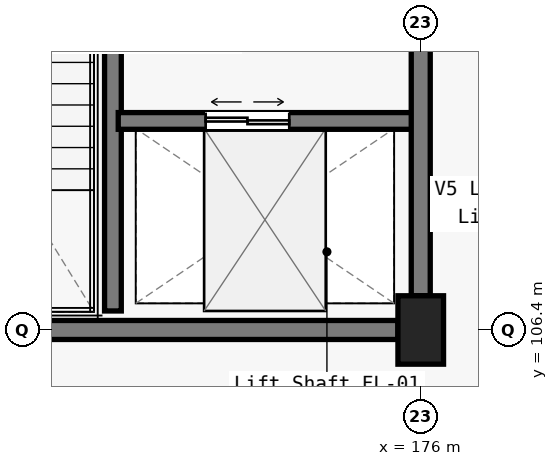
"""IFC4 building model, lengths in metres.
Left out: names, types, materials, properties, quantities, classifications, styles, units other than length and angle.
Written with IfcOpenShell. Run it as: python <this file> out.ifc"""

import sys

from ifc_helpers import new_model, si_unit, direction, frame, frame_2d, origin, origin_2d, place, context, subcontext, project, spatial, rectangle, extrude, element, fill, save


model = new_model("IFC4")
c1 = context("Model", 3, precision=1e-05, world=origin(), true_north=direction((0.0, 1.0)))
c2 = subcontext(c1, "Body", "Model", "MODEL_VIEW")
j1 = project(units=[si_unit("LENGTHUNIT", "METRE"), si_unit("PLANEANGLEUNIT", "RADIAN")], contexts=[c1])
p1 = place(None, origin())
s1 = spatial("IfcSite", under=j1, at=p1, CompositionType="ELEMENT")
p2 = place(p1, origin())
s2 = spatial("IfcBuilding", under=s1, at=p2, CompositionType="ELEMENT")
p3 = place(p2, origin())
s3 = spatial("IfcBuildingStorey", under=s2, at=p3, CompositionType="ELEMENT", Elevation=0.0)
p4 = place(p3, frame((176.0, 106.4, 0.0), z_axis=(0.0, 0.0, 1.0), x_axis=(1.0, 0.0, 0.0)))
e1 = element("IfcColumn", 1, at=p4, inside=s3, PredefinedType="COLUMN", context=c2, shape_type="SweptSolid", body=[
    extrude(rectangle(XDim=0.6, YDim=0.9, at=origin_2d()), origin(), (0.0, 0.0, 1.0), 5.4),
])
p5 = place(p3, frame((168.35, 106.4, 0.0), z_axis=(0.0, 0.0, 1.0), x_axis=(1.0, 0.0, 0.0)))
e2 = element("IfcWall", 2, at=p5, inside=s3, PredefinedType="SOLIDWALL", context=c2, shape_type="SweptSolid", body=[
    extrude(rectangle(XDim=7.35, YDim=0.25, at=frame_2d((3.675, 0.0))), origin(), (0.0, 0.0, 1.0), 4.225),
])
p6 = place(p3, frame((171.95, 106.65, 0.0), z_axis=(0.0, 0.0, 1.0), x_axis=(0.0, 1.0, 0.0)))
e3 = element("IfcWall", 3, at=p6, inside=s3, PredefinedType="SOLIDWALL", context=c2, shape_type="SweptSolid", body=[
    extrude(rectangle(XDim=7.1, YDim=0.22, at=frame_2d((3.55, 0.0))), origin(), (0.0, 0.0, 1.0), 5.1),
])
p7 = place(p6, frame((5.55, 0.0, 0.0)))
e4 = element("IfcOpeningElement", 4, at=p7, cuts=e3, PredefinedType="OPENING", context=c2, shape_type="SweptSolid", body=[
    extrude(rectangle(XDim=1.2, YDim=2.15, at=frame_2d((0.6, 1.075))), frame((0.0, 0.12, 0.0), z_axis=(0.0, -1.0, 0.0), x_axis=(1.0, 0.0, 0.0)), (0.0, 0.0, 1.0), 0.24),
])
p8 = place(p3, frame((172.02, 109.15, 0.0), z_axis=(0.0, 0.0, 1.0), x_axis=(1.0, 0.0, 0.0)))
e5 = element("IfcWall", 5, at=p8, inside=s3, PredefinedType="SOLIDWALL", context=c2, shape_type="SweptSolid", body=[
    extrude(rectangle(XDim=3.93, YDim=0.22, at=frame_2d((1.965, 0.0))), origin(), (0.0, 0.0, 1.0), 4.475),
])
p9 = place(p8, frame((1.15, 0.0, 0.0)))
e6 = element("IfcOpeningElement", 6, at=p9, cuts=e5, PredefinedType="OPENING", context=c2, shape_type="SweptSolid", body=[
    extrude(rectangle(XDim=1.1, YDim=2.2, at=frame_2d((0.55, 1.1))), frame((0.0, 0.12, 0.0), z_axis=(0.0, -1.0, 0.0), x_axis=(1.0, 0.0, 0.0)), (0.0, 0.0, 1.0), 0.24),
])
p10 = place(p3, frame((176.0, 106.85, 0.0), z_axis=(0.0, 0.0, 1.0), x_axis=(0.0, 1.0, 0.0)))
e7 = element("IfcWall", 7, at=p10, inside=s3, PredefinedType="SOLIDWALL", context=c2, shape_type="SweptSolid", body=[
    extrude(rectangle(XDim=6.775, YDim=0.25, at=frame_2d((3.387, 0.0))), origin(), (0.0, 0.0, 1.0), 4.35),
])
p11 = place(p10, frame((3.4, 0.0, 0.0)))
e8 = element("IfcOpeningElement", 8, at=p11, cuts=e7, PredefinedType="OPENING", context=c2, shape_type="SweptSolid", body=[
    extrude(rectangle(XDim=1.35, YDim=2.2, at=frame_2d((0.675, 1.1))), frame((0.0, 0.135, 0.0), z_axis=(0.0, -1.0, 0.0), x_axis=(1.0, 0.0, 0.0)), (0.0, 0.0, 1.0), 0.27),
])
p12 = place(p9, origin())
e9 = element("IfcDoor", 9, at=p12, inside=s3, OperationType="DOUBLE_DOOR_SLIDING", PredefinedType="DOOR", context=c2, shape_type="SweptSolid", body=[
    extrude(rectangle(XDim=1.1, YDim=2.2, at=frame_2d((0.55, 1.1))), frame((0.0, 0.025, 0.0), z_axis=(0.0, -1.0, 0.0), x_axis=(1.0, 0.0, 0.0)), (0.0, 0.0, 1.0), 0.05),
])
fill(e6, e9)
save(model, sys.argv[1])
